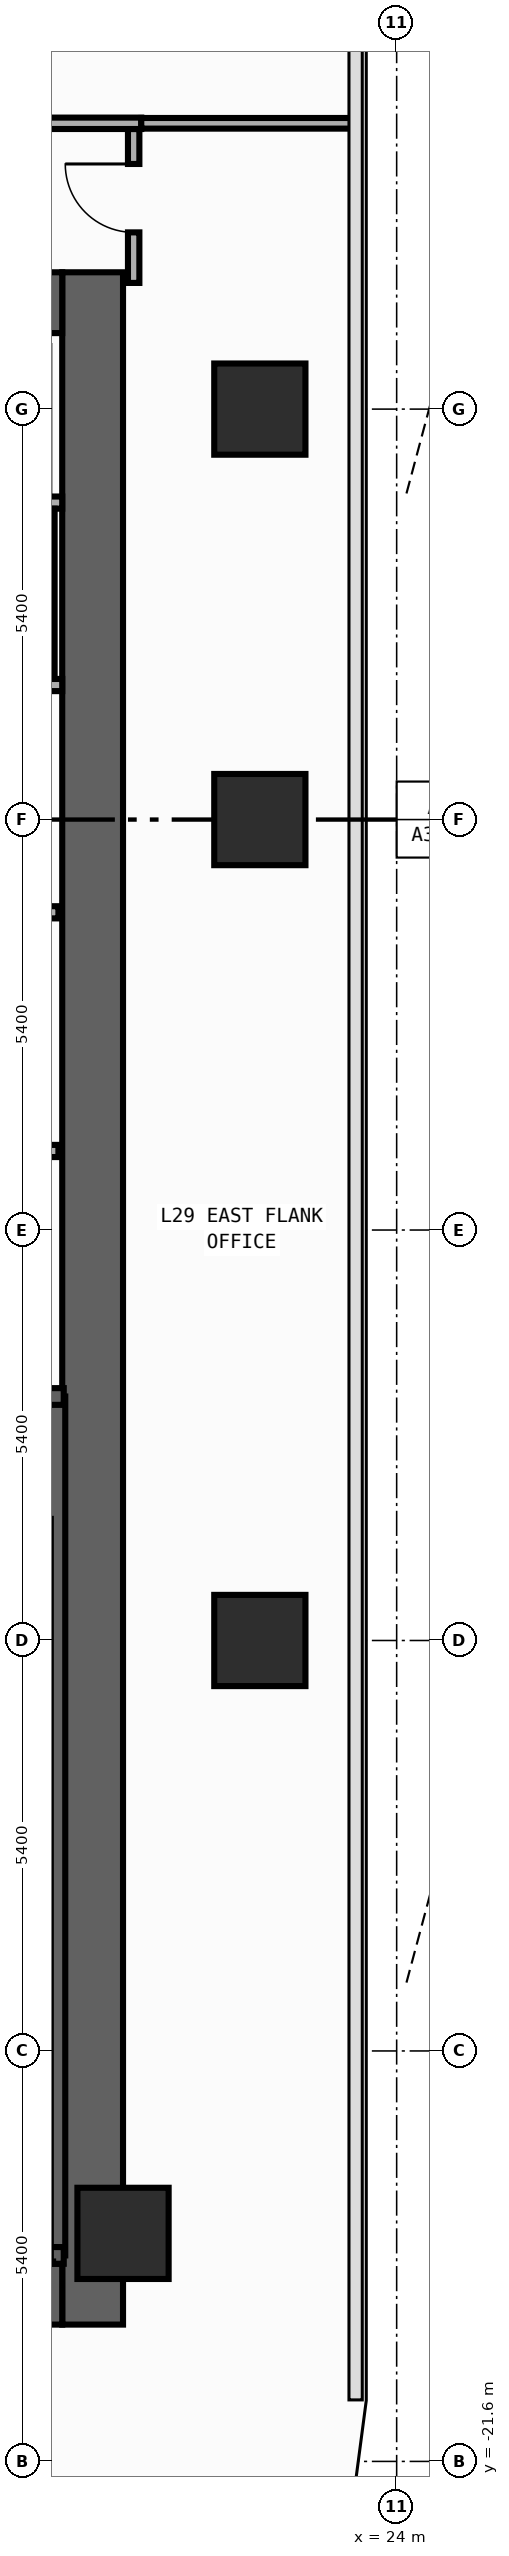
"""IFC4 building model, lengths in metres.
Left out: names, types, materials, properties, quantities, classifications, styles, units other than length and angle.
Written with IfcOpenShell. Run it as: python <this file> out.ifc"""

import sys

from ifc_helpers import new_model, si_unit, direction, frame, frame_2d, origin, origin_2d, place, context, subcontext, project, spatial, rectangle, extrude, element, fill, save


model = new_model("IFC4")
c1 = context("Model", 3, precision=1e-05, world=origin(), true_north=direction((0.0, 1.0)))
c2 = subcontext(c1, "Body", "Model", "MODEL_VIEW")
j1 = project(units=[si_unit("LENGTHUNIT", "METRE"), si_unit("PLANEANGLEUNIT", "RADIAN")], contexts=[c1])
p1 = place(None, origin())
s1 = spatial("IfcSite", under=j1, at=p1, CompositionType="ELEMENT")
p2 = place(p1, origin())
s2 = spatial("IfcBuilding", under=s1, at=p2, CompositionType="ELEMENT")
p3 = place(p2, frame((0.0, 0.0, 126.8)))
s3 = spatial("IfcBuildingStorey", under=s2, at=p3, CompositionType="ELEMENT", Elevation=126.8)
p4 = place(p3, frame((20.0, -19.8, 0.0), z_axis=(0.0, 0.0, 1.0), x_axis=(0.0, 1.0, 0.0)))
e1 = element("IfcWall", 1, at=p4, inside=s3, PredefinedType="SHEAR", context=c2, shape_type="SweptSolid", body=[
    extrude(rectangle(XDim=27.0, YDim=0.8, at=frame_2d((13.5, 0.0))), origin(), (0.0, 0.0, 1.0), 3.94),
])
for number, where, z_axis, x_axis in (
    (2, (12.8, -19.4, 0.0), (0.0, 0.0, 1.0), (1.0, 0.0, 0.0)),
    (3, (12.8, 6.8, 0.0), (0.0, 0.0, 1.0), (1.0, 0.0, 0.0)),
):
    element("IfcWall", number, at=place(p3, frame(where, z_axis=z_axis, x_axis=x_axis)), inside=s3, PredefinedType="SHEAR", context=c2, shape_type="SweptSolid", body=[
        extrude(rectangle(XDim=6.8, YDim=0.8, at=frame_2d((3.4, 0.0))), origin(), (0.0, 0.0, 1.0), 3.94),
    ])
p5 = place(p3, frame((19.53, -18.89, 0.0), z_axis=(0.0, 0.0, 1.0), x_axis=(0.0, 1.0, 0.0)))
e4 = element("IfcWall", 4, at=p5, inside=s3, PredefinedType="SHEAR", context=c2, shape_type="SweptSolid", body=[
    extrude(rectangle(XDim=11.3, YDim=0.22, at=frame_2d((5.65, 0.0))), origin(), (0.0, 0.0, 1.0), 3.94),
])
p6 = place(p3, frame((15.705, -18.89, 0.0), z_axis=(0.0, 0.0, 1.0), x_axis=(1.0, 0.0, 0.0)))
e5 = element("IfcWall", 5, at=p6, inside=s3, PredefinedType="SHEAR", context=c2, shape_type="SweptSolid", body=[
    extrude(rectangle(XDim=3.915, YDim=0.22, at=frame_2d((1.958, 0.0))), origin(), (0.0, 0.0, 1.0), 3.94),
])
p7 = place(p3, frame((19.62, -7.59, 0.0), z_axis=(0.0, 0.0, 1.0), x_axis=(-1.0, 0.0, 0.0)))
e6 = element("IfcWall", 6, at=p7, inside=s3, PredefinedType="SHEAR", context=c2, shape_type="SweptSolid", body=[
    extrude(rectangle(XDim=3.915, YDim=0.22, at=frame_2d((1.958, 0.0))), origin(), (0.0, 0.0, 1.0), 3.94),
])
p8 = place(p7, frame((1.08, 0.0, 0.0)))
e7 = element("IfcOpeningElement", 7, at=p8, cuts=e6, PredefinedType="OPENING", context=c2, shape_type="SweptSolid", body=[
    extrude(rectangle(XDim=1.1, YDim=2.2, at=frame_2d((0.55, 1.1))), frame((0.0, 0.12, 0.0), z_axis=(0.0, -1.0, 0.0), x_axis=(1.0, 0.0, 0.0)), (0.0, 0.0, 1.0), 0.24),
])
for number, where, z_axis, x_axis in (
    (8, (20.4, -18.6, 0.0), (0.0, 0.0, 1.0), (1.0, 0.0, 0.0)),
    (9, (22.2, -10.8, 0.0), (0.0, 0.0, 1.0), (1.0, 0.0, 0.0)),
    (10, (22.2, 0.0, 0.0), (0.0, 0.0, 1.0), (1.0, 0.0, 0.0)),
    (11, (22.2, 5.4, 0.0), (0.0, 0.0, 1.0), (1.0, 0.0, 0.0)),
):
    element("IfcColumn", number, at=place(p3, frame(where, z_axis=z_axis, x_axis=x_axis)), inside=s3, PredefinedType="COLUMN", context=c2, shape_type="SweptSolid", body=[
        extrude(rectangle(XDim=1.2, YDim=1.2, at=origin_2d()), origin(), (0.0, 0.0, 1.0), 4.2),
    ])
p9 = place(p3, frame((15.75, -4.36, 0.0), z_axis=(0.0, 0.0, 1.0), x_axis=(1.0, 0.0, 0.0)))
e12 = element("IfcWall", 12, at=p9, inside=s3, PredefinedType="STANDARD", context=c2, shape_type="SweptSolid", body=[
    extrude(rectangle(XDim=3.8, YDim=0.16, at=frame_2d((1.9, 0.0))), origin(), (0.0, 0.0, 1.0), 3.94),
])
p10 = place(p9, frame((1.47, 0.0, 0.0)))
e13 = element("IfcOpeningElement", 13, at=p10, cuts=e12, PredefinedType="OPENING", context=c2, shape_type="SweptSolid", body=[
    extrude(rectangle(XDim=1.15, YDim=2.2, at=frame_2d((0.575, 1.1))), frame((0.0, 0.09, 0.0), z_axis=(0.0, -1.0, 0.0), x_axis=(1.0, 0.0, 0.0)), (0.0, 0.0, 1.0), 0.18),
])
p11 = place(p3, frame((15.75, -1.22, 0.0), z_axis=(0.0, 0.0, 1.0), x_axis=(1.0, 0.0, 0.0)))
e14 = element("IfcWall", 14, at=p11, inside=s3, PredefinedType="STANDARD", context=c2, shape_type="SweptSolid", body=[
    extrude(rectangle(XDim=3.8, YDim=0.16, at=frame_2d((1.9, 0.0))), origin(), (0.0, 0.0, 1.0), 3.94),
])
for number, where, z_axis, x_axis in (
    (15, (17.31, 4.17, 0.0), (0.0, 0.0, 1.0), (1.0, 0.0, 0.0)),
    (16, (17.31, 1.77, 0.0), (0.0, 0.0, 1.0), (1.0, 0.0, 0.0)),
):
    element("IfcWall", number, at=place(p3, frame(where, z_axis=z_axis, x_axis=x_axis)), inside=s3, PredefinedType="PARTITIONING", context=c2, shape_type="SweptSolid", body=[
        extrude(rectangle(XDim=2.29, YDim=0.16, at=frame_2d((1.145, 0.0))), origin(), (0.0, 0.0, 1.0), 3.94),
    ])
p12 = place(p3, frame((20.54, 7.06, 0.0), z_axis=(0.0, 0.0, 1.0), x_axis=(0.0, 1.0, 0.0)))
e17 = element("IfcWall", 17, at=p12, inside=s3, PredefinedType="PARTITIONING", context=c2, shape_type="SweptSolid", body=[
    extrude(rectangle(XDim=2.025, YDim=0.15, at=frame_2d((1.012, 0.0))), origin(), (0.0, 0.0, 1.0), 3.94),
])
p13 = place(p12, frame((0.665, 0.0, 0.0)))
e18 = element("IfcOpeningElement", 18, at=p13, cuts=e17, PredefinedType="OPENING", context=c2, shape_type="SweptSolid", body=[
    extrude(rectangle(XDim=0.9, YDim=2.15, at=frame_2d((0.45, 1.075))), frame((0.0, 0.085, 0.0), z_axis=(0.0, -1.0, 0.0), x_axis=(1.0, 0.0, 0.0)), (0.0, 0.0, 1.0), 0.17),
])
p14 = place(p3, frame((11.81, 9.16, 0.0), z_axis=(0.0, 0.0, 1.0), x_axis=(1.0, 0.0, 0.0)))
e19 = element("IfcWall", 19, at=p14, inside=s3, PredefinedType="PARTITIONING", context=c2, shape_type="SweptSolid", body=[
    extrude(rectangle(XDim=8.83, YDim=0.15, at=frame_2d((4.415, 0.0))), origin(), (0.0, 0.0, 1.0), 3.94),
])
p15 = place(p14, frame((5.067, 0.0, 0.0)))
e20 = element("IfcOpeningElement", 20, at=p15, cuts=e19, PredefinedType="OPENING", context=c2, shape_type="SweptSolid", body=[
    extrude(rectangle(XDim=0.9, YDim=2.15, at=frame_2d((0.45, 1.075))), frame((0.0, 0.085, 0.0), z_axis=(0.0, -1.0, 0.0), x_axis=(1.0, 0.0, 0.0)), (0.0, 0.0, 1.0), 0.17),
])
p16 = place(p3, frame((20.64, 9.16, 0.0), z_axis=(0.0, 0.0, 1.0), x_axis=(1.0, 0.0, 0.0)))
e21 = element("IfcWall", 21, at=p16, inside=s3, PredefinedType="PARTITIONING", context=c2, shape_type="SweptSolid", body=[
    extrude(rectangle(XDim=2.815, YDim=0.14, at=frame_2d((1.408, 0.0))), origin(), (0.0, 0.0, 1.0), 3.94),
])
p17 = place(p3, frame((19.45, 4.09, 0.0), z_axis=(0.0, 0.0, 1.0), x_axis=(0.0, -1.0, 0.0)))
e22 = element("IfcWall", 22, at=p17, inside=s3, PredefinedType="PARTITIONING", context=c2, shape_type="SweptSolid", body=[
    extrude(rectangle(XDim=2.24, YDim=0.1, at=frame_2d((1.12, 0.0))), origin(), (0.0, 0.0, 1.0), 3.94),
])
p18 = place(p13, origin())
e23 = element("IfcDoor", 23, at=p18, inside=s3, OperationType="SINGLE_SWING_RIGHT", PredefinedType="DOOR", context=c2, shape_type="SweptSolid", body=[
    extrude(rectangle(XDim=0.9, YDim=2.15, at=frame_2d((0.45, 1.075))), frame((0.0, 0.025, 0.0), z_axis=(0.0, -1.0, 0.0), x_axis=(1.0, 0.0, 0.0)), (0.0, 0.0, 1.0), 0.05),
])
fill(e18, e23)
save(model, sys.argv[1])
